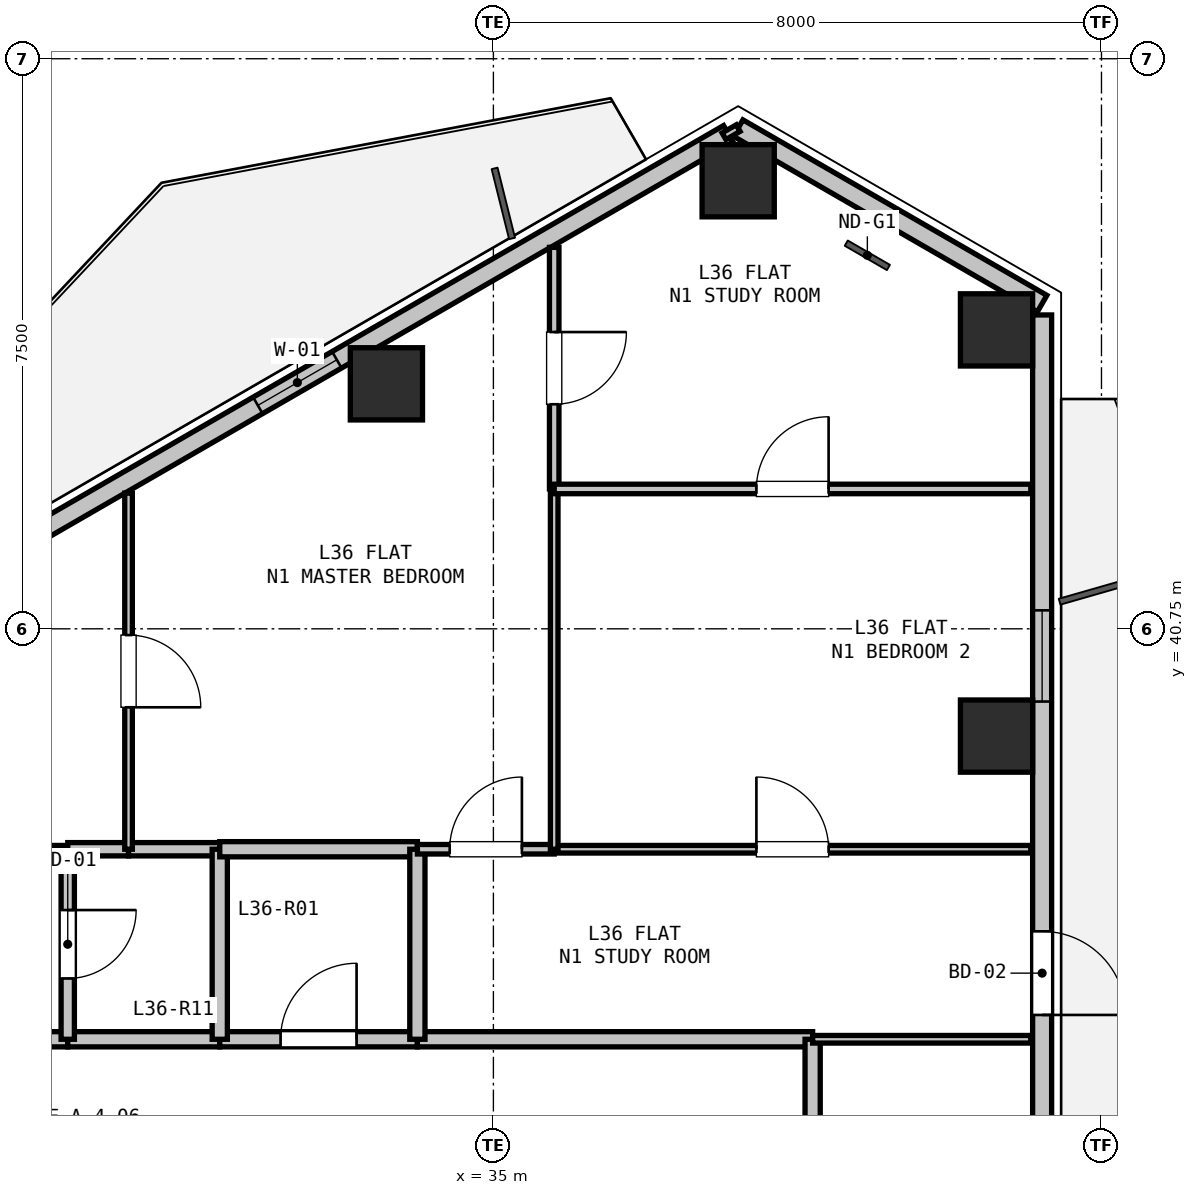
"""IFC4 building model, lengths in metres.
Left out: names, types, materials, properties, quantities, classifications, styles, units other than length and angle.
Written with IfcOpenShell. Run it as: python <this file> out.ifc"""

import sys

from ifc_helpers import new_model, si_unit, direction, frame, frame_2d, origin, origin_2d, place, context, subcontext, project, spatial, rectangle, hollow_rectangle, extrude, element, fill, save


model = new_model("IFC4")
c1 = context("Model", 3, precision=1e-05, world=origin(), true_north=direction((0.0, 1.0)))
c2 = subcontext(c1, "Body", "Model", "MODEL_VIEW")
j1 = project(units=[si_unit("LENGTHUNIT", "METRE"), si_unit("PLANEANGLEUNIT", "RADIAN")], contexts=[c1])
p1 = place(None, origin())
s1 = spatial("IfcSite", under=j1, at=p1, CompositionType="ELEMENT")
p2 = place(p1, origin())
s2 = spatial("IfcBuilding", under=s1, at=p2, CompositionType="ELEMENT")
p3 = place(p2, frame((0.0, 0.0, 131.1)))
s3 = spatial("IfcBuildingStorey", under=s2, at=p3, CompositionType="ELEMENT", Elevation=131.1)
for number, where, z_axis, x_axis in (
    (1, (33.593, 43.973, 0.0), (0.0, 0.0, 1.0), (1.0, 0.0, 0.0)),
    (2, (38.22, 46.645, 0.0), (0.0, 0.0, 1.0), (1.0, 0.0, 0.0)),
    (3, (41.619, 44.683, 0.0), (0.0, 0.0, 1.0), (1.0, 0.0, 0.0)),
    (4, (41.619, 39.339, 0.0), (0.0, 0.0, 1.0), (1.0, 0.0, 0.0)),
):
    element("IfcColumn", number, at=place(p3, frame(where, z_axis=z_axis, x_axis=x_axis)), inside=s3, PredefinedType="COLUMN", context=c2, shape_type="SweptSolid", body=[
        extrude(hollow_rectangle(XDim=0.95, YDim=0.95, WallThickness=0.028, at=origin_2d()), origin(), (0.0, 0.0, 1.0), 3.3),
    ])
p4 = place(p3, frame((38.22, 47.338, 0.0), z_axis=(0.0, 0.0, 1.0), x_axis=(0.866035021055, -0.499983342029, 0.0)))
e5 = element("IfcWall", 5, at=p4, inside=s3, PredefinedType="SOLIDWALL", context=c2, shape_type="SweptSolid", body=[
    extrude(rectangle(XDim=4.617, YDim=0.25, at=frame_2d((2.309, 0.0))), origin(), (0.0, 0.0, 1.0), 2.68),
])
p5 = place(p3, frame((28.403, 41.67, 0.0), z_axis=(0.0, 0.0, 1.0), x_axis=(0.86602239209, 0.500005216371, 0.0)))
e6 = element("IfcWall", 6, at=p5, inside=s3, PredefinedType="SOLIDWALL", context=c2, shape_type="SweptSolid", body=[
    extrude(rectangle(XDim=11.186, YDim=0.25, at=frame_2d((5.593, 0.0))), origin(), (0.0, 0.0, 1.0), 2.68),
])
p6 = place(p5, frame((4.039, 0.0, 0.9)))
e7 = element("IfcOpeningElement", 7, at=p6, cuts=e6, PredefinedType="OPENING", context=c2, shape_type="SweptSolid", body=[
    extrude(rectangle(XDim=1.2, YDim=1.4, at=frame_2d((0.6, 0.7))), frame((0.0, 0.135, 0.0), z_axis=(0.0, -1.0, 0.0), x_axis=(1.0, 0.0, 0.0)), (0.0, 0.0, 1.0), 0.27),
])
p7 = place(p3, frame((42.219, 44.879, 0.0), z_axis=(0.0, 0.0, 1.0), x_axis=(0.0, -1.0, 0.0)))
e8 = element("IfcWall", 8, at=p7, inside=s3, PredefinedType="SOLIDWALL", context=c2, shape_type="SweptSolid", body=[
    extrude(rectangle(XDim=11.186, YDim=0.25, at=frame_2d((5.593, 0.0))), origin(), (0.0, 0.0, 1.0), 2.68),
])
p8 = place(p7, frame((8.109, 0.0, 0.0)))
e9 = element("IfcOpeningElement", 9, at=p8, cuts=e8, PredefinedType="OPENING", context=c2, shape_type="SweptSolid", body=[
    extrude(rectangle(XDim=1.1, YDim=2.1, at=frame_2d((0.55, 1.05))), frame((0.0, 0.135, 0.0), z_axis=(0.0, -1.0, 0.0), x_axis=(1.0, 0.0, 0.0)), (0.0, 0.0, 1.0), 0.27),
])
p9 = place(p7, frame((3.886, 0.0, 0.9)))
e10 = element("IfcOpeningElement", 10, at=p9, cuts=e8, PredefinedType="OPENING", context=c2, shape_type="SweptSolid", body=[
    extrude(rectangle(XDim=1.2, YDim=1.4, at=frame_2d((0.6, 0.7))), frame((0.0, 0.135, 0.0), z_axis=(0.0, -1.0, 0.0), x_axis=(1.0, 0.0, 0.0)), (0.0, 0.0, 1.0), 0.27),
])
p10 = place(p3, frame((26.8, 35.35, 0.0), z_axis=(0.0, 0.0, 1.0), x_axis=(1.0, 0.0, 0.0)))
e11 = element("IfcWall", 11, at=p10, inside=s3, PredefinedType="PARTITIONING", context=c2, shape_type="SweptSolid", body=[
    extrude(rectangle(XDim=2.6, YDim=0.2, at=frame_2d((1.3, 0.0))), origin(), (0.0, 0.0, 1.0), 3.06),
])
p11 = place(p10, frame((0.8, 0.0, 0.0)))
e12 = element("IfcOpeningElement", 12, at=p11, cuts=e11, PredefinedType="OPENING", context=c2, shape_type="SweptSolid", body=[
    extrude(rectangle(XDim=1.0, YDim=2.15, at=frame_2d((0.5, 1.075))), frame((0.0, 0.11, 0.0), z_axis=(0.0, -1.0, 0.0), x_axis=(1.0, 0.0, 0.0)), (0.0, 0.0, 1.0), 0.22),
])
p12 = place(p3, frame((29.4, 35.35, 0.0), z_axis=(0.0, 0.0, 1.0), x_axis=(1.0, 0.0, 0.0)))
e13 = element("IfcWall", 13, at=p12, inside=s3, PredefinedType="PARTITIONING", context=c2, shape_type="SweptSolid", body=[
    extrude(rectangle(XDim=2.0, YDim=0.2, at=frame_2d((1.0, 0.0))), origin(), (0.0, 0.0, 1.0), 3.06),
])
p13 = place(p3, frame((31.4, 35.35, 0.0), z_axis=(0.0, 0.0, 1.0), x_axis=(1.0, 0.0, 0.0)))
e14 = element("IfcWall", 14, at=p13, inside=s3, PredefinedType="PARTITIONING", context=c2, shape_type="SweptSolid", body=[
    extrude(rectangle(XDim=2.6, YDim=0.2, at=frame_2d((1.3, 0.0))), origin(), (0.0, 0.0, 1.0), 3.06),
])
p14 = place(p13, frame((0.8, 0.0, 0.0)))
e15 = element("IfcOpeningElement", 15, at=p14, cuts=e14, PredefinedType="OPENING", context=c2, shape_type="SweptSolid", body=[
    extrude(rectangle(XDim=1.0, YDim=2.15, at=frame_2d((0.5, 1.075))), frame((0.0, 0.11, 0.0), z_axis=(0.0, -1.0, 0.0), x_axis=(1.0, 0.0, 0.0)), (0.0, 0.0, 1.0), 0.22),
])
p15 = place(p3, frame((34.0, 35.35, 0.0), z_axis=(0.0, 0.0, 1.0), x_axis=(1.0, 0.0, 0.0)))
e16 = element("IfcWall", 16, at=p15, inside=s3, PredefinedType="PARTITIONING", context=c2, shape_type="SweptSolid", body=[
    extrude(rectangle(XDim=5.2, YDim=0.2, at=frame_2d((2.6, 0.0))), origin(), (0.0, 0.0, 1.0), 2.433),
])
p16 = place(p3, frame((39.2, 35.35, 0.0), z_axis=(0.0, 0.0, 1.0), x_axis=(0.0, -1.0, 0.0)))
e17 = element("IfcWall", 17, at=p16, inside=s3, PredefinedType="PARTITIONING", context=c2, shape_type="SweptSolid", body=[
    extrude(rectangle(XDim=1.75, YDim=0.2, at=frame_2d((0.875, 0.0))), origin(), (0.0, 0.0, 1.0), 3.06),
])
p17 = place(p3, frame((26.8, 37.85, 0.0), z_axis=(0.0, 0.0, 1.0), x_axis=(1.0, 0.0, 0.0)))
e18 = element("IfcWall", 18, at=p17, inside=s3, PredefinedType="PARTITIONING", context=c2, shape_type="SweptSolid", body=[
    extrude(rectangle(XDim=2.6, YDim=0.1, at=frame_2d((1.3, 0.0))), origin(), (0.0, 0.0, 1.0), 3.06),
])
p18 = place(p17, frame((0.825, 0.0, 0.0)))
e19 = element("IfcOpeningElement", 19, at=p18, cuts=e18, PredefinedType="OPENING", context=c2, shape_type="SweptSolid", body=[
    extrude(rectangle(XDim=0.95, YDim=2.1, at=frame_2d((0.475, 1.05))), frame((0.0, 0.06, 0.0), z_axis=(0.0, -1.0, 0.0), x_axis=(1.0, 0.0, 0.0)), (0.0, 0.0, 1.0), 0.12),
])
p19 = place(p3, frame((29.4, 37.85, 0.0), z_axis=(0.0, 0.0, 1.0), x_axis=(0.0, -1.0, 0.0)))
e20 = element("IfcWall", 20, at=p19, inside=s3, PredefinedType="PLUMBINGWALL", context=c2, shape_type="SweptSolid", body=[
    extrude(rectangle(XDim=2.5, YDim=0.175, at=frame_2d((1.25, 0.0))), origin(), (0.0, 0.0, 1.0), 3.06),
])
p20 = place(p19, frame((0.8, 0.0, 0.0)))
e21 = element("IfcOpeningElement", 21, at=p20, cuts=e20, PredefinedType="OPENING", context=c2, shape_type="SweptSolid", body=[
    extrude(rectangle(XDim=0.9, YDim=2.1, at=frame_2d((0.45, 1.05))), frame((0.0, 0.097, 0.0), z_axis=(0.0, -1.0, 0.0), x_axis=(1.0, 0.0, 0.0)), (0.0, 0.0, 1.0), 0.195),
])
p21 = place(p3, frame((29.4, 37.85, 0.0), z_axis=(0.0, 0.0, 1.0), x_axis=(1.0, 0.0, 0.0)))
e22 = element("IfcWall", 22, at=p21, inside=s3, PredefinedType="PLUMBINGWALL", context=c2, shape_type="SweptSolid", body=[
    extrude(rectangle(XDim=0.8, YDim=0.175, at=frame_2d((0.4, 0.0))), origin(), (0.0, 0.0, 1.0), 3.06),
])
p22 = place(p3, frame((30.2, 37.85, 0.0), z_axis=(0.0, 0.0, 1.0), x_axis=(1.0, 0.0, 0.0)))
e23 = element("IfcWall", 23, at=p22, inside=s3, PredefinedType="PLUMBINGWALL", context=c2, shape_type="SweptSolid", body=[
    extrude(rectangle(XDim=1.2, YDim=0.175, at=frame_2d((0.6, 0.0))), origin(), (0.0, 0.0, 1.0), 3.06),
])
p23 = place(p3, frame((31.4, 37.85, 0.0), z_axis=(0.0, 0.0, 1.0), x_axis=(0.0, -1.0, 0.0)))
e24 = element("IfcWall", 24, at=p23, inside=s3, PredefinedType="PARTITIONING", context=c2, shape_type="SweptSolid", body=[
    extrude(rectangle(XDim=2.5, YDim=0.2, at=frame_2d((1.25, 0.0))), origin(), (0.0, 0.0, 1.0), 3.06),
])
p24 = place(p3, frame((31.4, 37.85, 0.0), z_axis=(0.0, 0.0, 1.0), x_axis=(1.0, 0.0, 0.0)))
e25 = element("IfcWall", 25, at=p24, inside=s3, PredefinedType="PARTITIONING", context=c2, shape_type="SweptSolid", body=[
    extrude(rectangle(XDim=2.6, YDim=0.2, at=frame_2d((1.3, 0.0))), origin(), (0.0, 0.0, 1.0), 3.06),
])
p25 = place(p3, frame((34.0, 37.85, 0.0), z_axis=(0.0, 0.0, 1.0), x_axis=(0.0, -1.0, 0.0)))
e26 = element("IfcWall", 26, at=p25, inside=s3, PredefinedType="PARTITIONING", context=c2, shape_type="SweptSolid", body=[
    extrude(rectangle(XDim=2.5, YDim=0.2, at=frame_2d((1.25, 0.0))), origin(), (0.0, 0.0, 1.0), 3.06),
])
p26 = place(p3, frame((42.07, 35.35, 0.0), z_axis=(0.0, 0.0, 1.0), x_axis=(-1.0, 0.0, 0.0)))
e27 = element("IfcWall", 27, at=p26, inside=s3, PredefinedType="PARTITIONING", context=c2, shape_type="SweptSolid", body=[
    extrude(rectangle(XDim=2.87, YDim=0.1, at=frame_2d((1.435, 0.0))), origin(), (0.0, 0.0, 1.0), 2.365),
])
p27 = place(p3, frame((34.0, 37.85, 0.0), z_axis=(0.0, 0.0, 1.0), x_axis=(1.0, 0.0, 0.0)))
e28 = element("IfcWall", 28, at=p27, inside=s3, PredefinedType="PARTITIONING", context=c2, shape_type="SweptSolid", body=[
    extrude(rectangle(XDim=1.8, YDim=0.125, at=frame_2d((0.9, 0.0))), origin(), (0.0, 0.0, 1.0), 3.06),
])
p28 = place(p27, frame((0.425, 0.0, 0.0)))
e29 = element("IfcOpeningElement", 29, at=p28, cuts=e28, PredefinedType="OPENING", context=c2, shape_type="SweptSolid", body=[
    extrude(rectangle(XDim=0.95, YDim=2.1, at=frame_2d((0.475, 1.05))), frame((0.0, 0.073, 0.0), z_axis=(0.0, -1.0, 0.0), x_axis=(1.0, 0.0, 0.0)), (0.0, 0.0, 1.0), 0.145),
])
p29 = place(p3, frame((35.8, 37.85, 0.0), z_axis=(0.0, 0.0, 1.0), x_axis=(1.0, 0.0, 0.0)))
e30 = element("IfcWall", 30, at=p29, inside=s3, PredefinedType="PARTITIONING", context=c2, shape_type="SweptSolid", body=[
    extrude(rectangle(XDim=6.27, YDim=0.1, at=frame_2d((3.135, 0.0))), origin(), (0.0, 0.0, 1.0), 2.365),
])
p30 = place(p29, frame((2.66, 0.0, 0.0)))
e31 = element("IfcOpeningElement", 31, at=p30, cuts=e30, PredefinedType="OPENING", context=c2, shape_type="SweptSolid", body=[
    extrude(rectangle(XDim=0.95, YDim=2.1, at=frame_2d((0.475, 1.05))), frame((0.0, 0.06, 0.0), z_axis=(0.0, -1.0, 0.0), x_axis=(1.0, 0.0, 0.0)), (0.0, 0.0, 1.0), 0.12),
])
p31 = place(p3, frame((30.2, 42.535, 0.0), z_axis=(0.0, 0.0, 1.0), x_axis=(0.0, -1.0, 0.0)))
e32 = element("IfcWall", 32, at=p31, inside=s3, PredefinedType="PARTITIONING", context=c2, shape_type="SweptSolid", body=[
    extrude(rectangle(XDim=4.685, YDim=0.1, at=frame_2d((2.342, 0.0))), origin(), (0.0, 0.0, 1.0), 2.365),
])
p32 = place(p31, frame((1.867, 0.0, 0.0)))
e33 = element("IfcOpeningElement", 33, at=p32, cuts=e32, PredefinedType="OPENING", context=c2, shape_type="SweptSolid", body=[
    extrude(rectangle(XDim=0.95, YDim=2.1, at=frame_2d((0.475, 1.05))), frame((0.0, 0.06, 0.0), z_axis=(0.0, -1.0, 0.0), x_axis=(1.0, 0.0, 0.0)), (0.0, 0.0, 1.0), 0.12),
])
p33 = place(p3, frame((35.8, 45.768, 0.0), z_axis=(0.0, 0.0, 1.0), x_axis=(0.0, -1.0, 0.0)))
e34 = element("IfcWall", 34, at=p33, inside=s3, PredefinedType="PARTITIONING", context=c2, shape_type="SweptSolid", body=[
    extrude(rectangle(XDim=3.178, YDim=0.125, at=frame_2d((1.589, 0.0))), origin(), (0.0, 0.0, 1.0), 2.724),
])
p34 = place(p33, frame((1.114, 0.0, 0.0)))
e35 = element("IfcOpeningElement", 35, at=p34, cuts=e34, PredefinedType="OPENING", context=c2, shape_type="SweptSolid", body=[
    extrude(rectangle(XDim=0.95, YDim=2.1, at=frame_2d((0.475, 1.05))), frame((0.0, 0.073, 0.0), z_axis=(0.0, -1.0, 0.0), x_axis=(1.0, 0.0, 0.0)), (0.0, 0.0, 1.0), 0.145),
])
p35 = place(p3, frame((35.8, 42.59, 0.0), z_axis=(0.0, 0.0, 1.0), x_axis=(0.0, -1.0, 0.0)))
e36 = element("IfcWall", 36, at=p35, inside=s3, PredefinedType="PARTITIONING", context=c2, shape_type="SweptSolid", body=[
    extrude(rectangle(XDim=4.74, YDim=0.1, at=frame_2d((2.37, 0.0))), origin(), (0.0, 0.0, 1.0), 3.06),
])
p36 = place(p3, frame((35.8, 42.59, 0.0), z_axis=(0.0, 0.0, 1.0), x_axis=(1.0, 0.0, 0.0)))
e37 = element("IfcWall", 37, at=p36, inside=s3, PredefinedType="PARTITIONING", context=c2, shape_type="SweptSolid", body=[
    extrude(rectangle(XDim=6.27, YDim=0.125, at=frame_2d((3.135, 0.0))), origin(), (0.0, 0.0, 1.0), 2.433),
])
p37 = place(p36, frame((2.66, 0.0, 0.0)))
e38 = element("IfcOpeningElement", 38, at=p37, cuts=e37, PredefinedType="OPENING", context=c2, shape_type="SweptSolid", body=[
    extrude(rectangle(XDim=0.95, YDim=2.1, at=frame_2d((0.475, 1.05))), frame((0.0, 0.073, 0.0), z_axis=(0.0, -1.0, 0.0), x_axis=(1.0, 0.0, 0.0)), (0.0, 0.0, 1.0), 0.145),
])
p38 = place(p3, frame((38.034, 47.23, 0.0), z_axis=(0.0, 0.0, 1.0), x_axis=(0.865581379588, 0.500768285049, 0.0)))
e39 = element("IfcWall", 39, at=p38, inside=s3, PredefinedType="PARTITIONING", context=c2, shape_type="SweptSolid", body=[
    extrude(rectangle(XDim=0.216, YDim=0.1, at=frame_2d((0.108, 0.0))), origin(), (0.0, 0.0, 1.0), 3.06),
])
p39 = place(p6, origin())
e40 = element("IfcWindow", 40, at=p39, inside=s3, PartitioningType="SINGLE_PANEL", PredefinedType="WINDOW", context=c2, shape_type="SweptSolid", body=[
    extrude(rectangle(XDim=1.2, YDim=1.4, at=frame_2d((0.6, 0.7))), frame((0.0, 0.03, 0.0), z_axis=(0.0, -1.0, 0.0), x_axis=(1.0, 0.0, 0.0)), (0.0, 0.0, 1.0), 0.06),
])
fill(e7, e40)
p40 = place(p8, origin())
e41 = element("IfcDoor", 41, at=p40, inside=s3, OperationType="SINGLE_SWING_RIGHT", PredefinedType="DOOR", context=c2, shape_type="SweptSolid", body=[
    extrude(rectangle(XDim=1.1, YDim=2.1, at=frame_2d((0.55, 1.05))), frame((0.0, 0.025, 0.0), z_axis=(0.0, -1.0, 0.0), x_axis=(1.0, 0.0, 0.0)), (0.0, 0.0, 1.0), 0.05),
])
fill(e9, e41)
p41 = place(p9, origin())
e42 = element("IfcWindow", 42, at=p41, inside=s3, PartitioningType="SINGLE_PANEL", PredefinedType="WINDOW", context=c2, shape_type="SweptSolid", body=[
    extrude(rectangle(XDim=1.2, YDim=1.4, at=frame_2d((0.6, 0.7))), frame((0.0, 0.03, 0.0), z_axis=(0.0, -1.0, 0.0), x_axis=(1.0, 0.0, 0.0)), (0.0, 0.0, 1.0), 0.06),
])
fill(e10, e42)
p42 = place(p14, origin())
e43 = element("IfcDoor", 43, at=p42, inside=s3, OperationType="SINGLE_SWING_RIGHT", PredefinedType="DOOR", context=c2, shape_type="SweptSolid", body=[
    extrude(rectangle(XDim=1.0, YDim=2.15, at=frame_2d((0.5, 1.075))), frame((0.0, 0.025, 0.0), z_axis=(0.0, -1.0, 0.0), x_axis=(1.0, 0.0, 0.0)), (0.0, 0.0, 1.0), 0.05),
])
fill(e15, e43)
p43 = place(p20, origin())
e44 = element("IfcDoor", 44, at=p43, inside=s3, OperationType="SINGLE_SWING_LEFT", PredefinedType="DOOR", context=c2, shape_type="SweptSolid", body=[
    extrude(rectangle(XDim=0.9, YDim=2.1, at=frame_2d((0.45, 1.05))), frame((0.0, 0.025, 0.0), z_axis=(0.0, -1.0, 0.0), x_axis=(1.0, 0.0, 0.0)), (0.0, 0.0, 1.0), 0.05),
])
fill(e21, e44)
p44 = place(p28, origin())
e45 = element("IfcDoor", 45, at=p44, inside=s3, OperationType="SINGLE_SWING_RIGHT", PredefinedType="DOOR", context=c2, shape_type="SweptSolid", body=[
    extrude(rectangle(XDim=0.95, YDim=2.1, at=frame_2d((0.475, 1.05))), frame((0.0, 0.025, 0.0), z_axis=(0.0, -1.0, 0.0), x_axis=(1.0, 0.0, 0.0)), (0.0, 0.0, 1.0), 0.05),
])
fill(e29, e45)
p45 = place(p30, origin())
e46 = element("IfcDoor", 46, at=p45, inside=s3, OperationType="SINGLE_SWING_LEFT", PredefinedType="DOOR", context=c2, shape_type="SweptSolid", body=[
    extrude(rectangle(XDim=0.95, YDim=2.1, at=frame_2d((0.475, 1.05))), frame((0.0, 0.025, 0.0), z_axis=(0.0, -1.0, 0.0), x_axis=(1.0, 0.0, 0.0)), (0.0, 0.0, 1.0), 0.05),
])
fill(e31, e46)
p46 = place(p32, origin())
e47 = element("IfcDoor", 47, at=p46, inside=s3, OperationType="SINGLE_SWING_RIGHT", PredefinedType="DOOR", context=c2, shape_type="SweptSolid", body=[
    extrude(rectangle(XDim=0.95, YDim=2.1, at=frame_2d((0.475, 1.05))), frame((0.0, 0.025, 0.0), z_axis=(0.0, -1.0, 0.0), x_axis=(1.0, 0.0, 0.0)), (0.0, 0.0, 1.0), 0.05),
])
fill(e33, e47)
p47 = place(p34, origin())
e48 = element("IfcDoor", 48, at=p47, inside=s3, OperationType="SINGLE_SWING_LEFT", PredefinedType="DOOR", context=c2, shape_type="SweptSolid", body=[
    extrude(rectangle(XDim=0.95, YDim=2.1, at=frame_2d((0.475, 1.05))), frame((0.0, 0.025, 0.0), z_axis=(0.0, -1.0, 0.0), x_axis=(1.0, 0.0, 0.0)), (0.0, 0.0, 1.0), 0.05),
])
fill(e35, e48)
p48 = place(p37, origin())
e49 = element("IfcDoor", 49, at=p48, inside=s3, OperationType="SINGLE_SWING_RIGHT", PredefinedType="DOOR", context=c2, shape_type="SweptSolid", body=[
    extrude(rectangle(XDim=0.95, YDim=2.1, at=frame_2d((0.475, 1.05))), frame((0.0, 0.025, 0.0), z_axis=(0.0, -1.0, 0.0), x_axis=(1.0, 0.0, 0.0)), (0.0, 0.0, 1.0), 0.05),
])
fill(e38, e49)
save(model, sys.argv[1])
